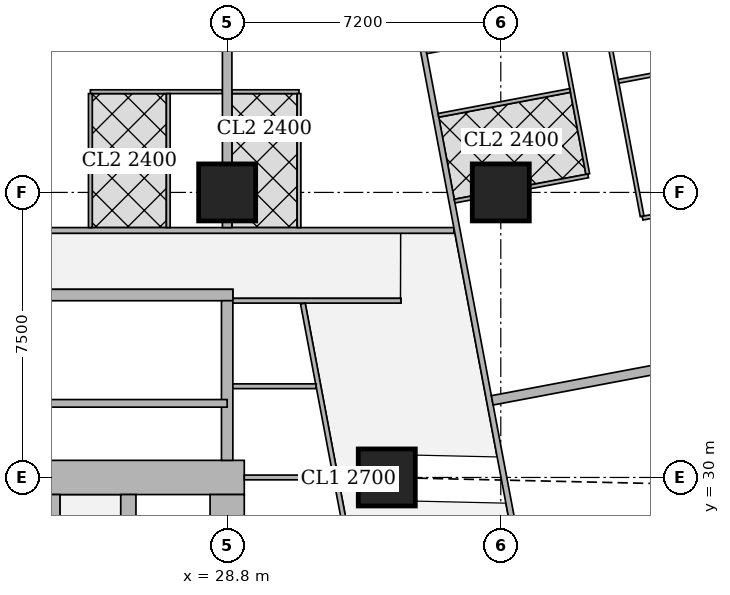
"""IFC4 building model, lengths in metres.
Left out: names, types, materials, properties, quantities, classifications, styles, units other than length and angle.
Written with IfcOpenShell. Run it as: python <this file> out.ifc"""

import sys

from ifc_helpers import new_model, si_unit, direction, frame, frame_2d, origin, origin_2d, place, context, subcontext, project, spatial, rectangle, extrude, element, fill, save


model = new_model("IFC4")
c1 = context("Model", 3, precision=1e-05, world=origin(), true_north=direction((0.0, 1.0)))
c2 = subcontext(c1, "Body", "Model", "MODEL_VIEW")
j1 = project(units=[si_unit("LENGTHUNIT", "METRE"), si_unit("PLANEANGLEUNIT", "RADIAN")], contexts=[c1])
p1 = place(None, origin())
s1 = spatial("IfcSite", under=j1, at=p1, CompositionType="ELEMENT")
p2 = place(p1, origin())
s2 = spatial("IfcBuilding", under=s1, at=p2, CompositionType="ELEMENT")
p3 = place(p2, frame((0.0, 0.0, 180.8)))
s3 = spatial("IfcBuildingStorey", under=s2, at=p3, CompositionType="ELEMENT", Elevation=180.8)
for number, where, z_axis, x_axis in (
    (1, (33.0, 30.0, 0.0), (0.0, 0.0, 1.0), (1.0, 0.0, 0.0)),
    (2, (28.8, 37.5, 0.0), (0.0, 0.0, 1.0), (1.0, 0.0, 0.0)),
    (3, (36.0, 37.5, 0.0), (0.0, 0.0, 1.0), (1.0, 0.0, 0.0)),
):
    element("IfcColumn", number, at=place(p3, frame(where, z_axis=z_axis, x_axis=x_axis)), inside=s3, PredefinedType="COLUMN", context=c2, shape_type="SweptSolid", body=[
        extrude(rectangle(XDim=1.5, YDim=1.5, at=origin_2d()), origin(), (0.0, 0.0, 1.0), 3.75),
    ])
p4 = place(p3, frame((13.95, 30.0, 0.0), z_axis=(0.0, 0.0, 1.0), x_axis=(1.0, 0.0, 0.0)))
e4 = element("IfcWall", 4, at=p4, inside=s3, PredefinedType="SHEAR", context=c2, shape_type="SweptSolid", body=[
    extrude(rectangle(XDim=15.3, YDim=0.9, at=frame_2d((7.65, 0.0))), origin(), (0.0, 0.0, 1.0), 3.75),
])
p5 = place(p4, frame((4.45, 0.0, 0.0)))
e5 = element("IfcOpeningElement", 5, at=p5, cuts=e4, PredefinedType="OPENING", context=c2, shape_type="SweptSolid", body=[
    extrude(rectangle(XDim=1.8, YDim=2.1, at=frame_2d((0.9, 1.05))), frame((0.0, 0.46, 0.0), z_axis=(0.0, -1.0, 0.0), x_axis=(1.0, 0.0, 0.0)), (0.0, 0.0, 1.0), 0.92),
])
p6 = place(p4, frame((10.7, 0.0, 0.0)))
e6 = element("IfcOpeningElement", 6, at=p6, cuts=e4, PredefinedType="OPENING", context=c2, shape_type="SweptSolid", body=[
    extrude(rectangle(XDim=1.1, YDim=2.1, at=frame_2d((0.55, 1.05))), frame((0.0, 0.46, 0.0), z_axis=(0.0, -1.0, 0.0), x_axis=(1.0, 0.0, 0.0)), (0.0, 0.0, 1.0), 0.92),
])
p7 = place(p3, frame((28.8, 15.45, 0.0), z_axis=(0.0, 0.0, 1.0), x_axis=(0.0, 1.0, 0.0)))
e7 = element("IfcWall", 7, at=p7, inside=s3, PredefinedType="SHEAR", context=c2, shape_type="SweptSolid", body=[
    extrude(rectangle(XDim=14.1, YDim=0.9, at=frame_2d((7.05, 0.0))), origin(), (0.0, 0.0, 1.0), 3.75),
])
p8 = place(p3, frame((24.2, 15.45, 0.0), z_axis=(0.0, 0.0, 1.0), x_axis=(0.0, 1.0, 0.0)))
e8 = element("IfcWall", 8, at=p8, inside=s3, PredefinedType="SHEAR", context=c2, shape_type="SweptSolid", body=[
    extrude(rectangle(XDim=14.1, YDim=0.4, at=frame_2d((7.05, 0.0))), origin(), (0.0, 0.0, 1.0), 3.75),
])
p9 = place(p3, frame((26.2, 26.45, 0.0), z_axis=(0.0, 0.0, 1.0), x_axis=(0.0, 1.0, 0.0)))
e9 = element("IfcWall", 9, at=p9, inside=s3, PredefinedType="SHEAR", context=c2, shape_type="SweptSolid", body=[
    extrude(rectangle(XDim=3.1, YDim=0.4, at=frame_2d((1.55, 0.0))), origin(), (0.0, 0.0, 1.0), 3.75),
])
p10 = place(p9, frame((1.075, 0.0, 0.0)))
e10 = element("IfcOpeningElement", 10, at=p10, cuts=e9, PredefinedType="OPENING", context=c2, shape_type="SweptSolid", body=[
    extrude(rectangle(XDim=1.2, YDim=2.1, at=frame_2d((0.6, 1.05))), frame((0.0, 0.21, 0.0), z_axis=(0.0, -1.0, 0.0), x_axis=(1.0, 0.0, 0.0)), (0.0, 0.0, 1.0), 0.42),
])
p11 = place(p3, frame((21.45, 34.8, 0.0), z_axis=(0.0, 0.0, 1.0), x_axis=(1.0, 0.0, 0.0)))
e11 = element("IfcWall", 11, at=p11, inside=s3, PredefinedType="SHEAR", context=c2, shape_type="SweptSolid", body=[
    extrude(rectangle(XDim=7.5, YDim=0.3, at=frame_2d((3.75, 0.0))), origin(), (0.0, 0.0, 1.0), 3.75),
])
p12 = place(p11, frame((0.5, 0.0, 0.0)))
e12 = element("IfcOpeningElement", 12, at=p12, cuts=e11, PredefinedType="OPENING", context=c2, shape_type="SweptSolid", body=[
    extrude(rectangle(XDim=1.1, YDim=2.1, at=frame_2d((0.55, 1.05))), frame((0.0, 0.16, 0.0), z_axis=(0.0, -1.0, 0.0), x_axis=(1.0, 0.0, 0.0)), (0.0, 0.0, 1.0), 0.32),
])
p13 = place(p3, frame((28.8, 30.45, 0.0), z_axis=(0.0, 0.0, 1.0), x_axis=(0.0, 1.0, 0.0)))
e13 = element("IfcWall", 13, at=p13, inside=s3, PredefinedType="SHEAR", context=c2, shape_type="SweptSolid", body=[
    extrude(rectangle(XDim=4.2, YDim=0.3, at=frame_2d((2.1, 0.0))), origin(), (0.0, 0.0, 1.0), 3.75),
])
p14 = place(p3, frame((8.35, 36.5, 0.0), z_axis=(0.0, 0.0, 1.0), x_axis=(1.0, 0.0, 0.0)))
e14 = element("IfcWall", 14, at=p14, inside=s3, PredefinedType="SOLIDWALL", context=c2, shape_type="SweptSolid", body=[
    extrude(rectangle(XDim=26.415, YDim=0.15, at=frame_2d((13.208, 0.0))), origin(), (0.0, 0.0, 1.0), 3.5),
])
p15 = place(p14, frame((2.6, 0.0, 0.0)))
e15 = element("IfcOpeningElement", 15, at=p15, cuts=e14, PredefinedType="OPENING", context=c2, shape_type="SweptSolid", body=[
    extrude(rectangle(XDim=1.0, YDim=2.1, at=frame_2d((0.5, 1.05))), frame((0.0, 0.085, 0.0), z_axis=(0.0, -1.0, 0.0), x_axis=(1.0, 0.0, 0.0)), (0.0, 0.0, 1.0), 0.17),
])
p16 = place(p14, frame((14.75, 0.0, 0.0)))
e16 = element("IfcOpeningElement", 16, at=p16, cuts=e14, PredefinedType="OPENING", context=c2, shape_type="SweptSolid", body=[
    extrude(rectangle(XDim=1.0, YDim=2.1, at=frame_2d((0.5, 1.05))), frame((0.0, 0.085, 0.0), z_axis=(0.0, -1.0, 0.0), x_axis=(1.0, 0.0, 0.0)), (0.0, 0.0, 1.0), 0.17),
])
p17 = place(p14, frame((23.923, 0.0, 0.0)))
e17 = element("IfcOpeningElement", 17, at=p17, cuts=e14, PredefinedType="OPENING", context=c2, shape_type="SweptSolid", body=[
    extrude(rectangle(XDim=1.0, YDim=2.1, at=frame_2d((0.5, 1.05))), frame((0.0, 0.085, 0.0), z_axis=(0.0, -1.0, 0.0), x_axis=(1.0, 0.0, 0.0)), (0.0, 0.0, 1.0), 0.17),
])
p18 = place(p3, frame((33.623, 43.022, 0.0), z_axis=(0.0, 0.0, 1.0), x_axis=(0.185596841028, -0.98262597798, 0.0)))
e18 = element("IfcWall", 18, at=p18, inside=s3, PredefinedType="SOLIDWALL", context=c2, shape_type="SweptSolid", body=[
    extrude(rectangle(XDim=41.66, YDim=0.15, at=frame_2d((20.83, 0.0))), origin(), (0.0, 0.0, 1.0), 2.5),
])
p19 = place(p18, frame((8.034, 0.0, 0.0)))
e19 = element("IfcOpeningElement", 19, at=p19, cuts=e18, PredefinedType="OPENING", context=c2, shape_type="SweptSolid", body=[
    extrude(rectangle(XDim=1.0, YDim=2.1, at=frame_2d((0.5, 1.05))), frame((0.0, 0.085, 0.0), z_axis=(0.0, -1.0, 0.0), x_axis=(1.0, 0.0, 0.0)), (0.0, 0.0, 1.0), 0.17),
])
p20 = place(p18, frame((12.611, 0.0, 0.0)))
e20 = element("IfcOpeningElement", 20, at=p20, cuts=e18, PredefinedType="OPENING", context=c2, shape_type="SweptSolid", body=[
    extrude(rectangle(XDim=1.0, YDim=2.1, at=frame_2d((0.5, 1.05))), frame((0.0, 0.085, 0.0), z_axis=(0.0, -1.0, 0.0), x_axis=(1.0, 0.0, 0.0)), (0.0, 0.0, 1.0), 0.17),
])
p21 = place(p18, frame((20.242, 0.0, 0.0)))
e21 = element("IfcOpeningElement", 21, at=p21, cuts=e18, PredefinedType="OPENING", context=c2, shape_type="SweptSolid", body=[
    extrude(rectangle(XDim=1.0, YDim=2.1, at=frame_2d((0.5, 1.05))), frame((0.0, 0.085, 0.0), z_axis=(0.0, -1.0, 0.0), x_axis=(1.0, 0.0, 0.0)), (0.0, 0.0, 1.0), 0.17),
])
p22 = place(p18, frame((31.206, 0.0, 0.0)))
e22 = element("IfcOpeningElement", 22, at=p22, cuts=e18, PredefinedType="OPENING", context=c2, shape_type="SweptSolid", body=[
    extrude(rectangle(XDim=1.0, YDim=2.1, at=frame_2d((0.5, 1.05))), frame((0.0, 0.085, 0.0), z_axis=(0.0, -1.0, 0.0), x_axis=(1.0, 0.0, 0.0)), (0.0, 0.0, 1.0), 0.17),
])
p23 = place(p3, frame((38.701, 42.27, 0.0), z_axis=(0.0, 0.0, 1.0), x_axis=(0.185474244877, -0.982649125826, 0.0)))
e23 = element("IfcWall", 23, at=p23, inside=s3, PredefinedType="PARTITIONING", context=c2, shape_type="SweptSolid", body=[
    extrude(rectangle(XDim=5.494, YDim=0.1, at=frame_2d((2.747, 0.0))), origin(), (0.0, 0.0, 1.0), 3.5),
])
p24 = place(p23, frame((3.085, 0.0, 0.0)))
e24 = element("IfcOpeningElement", 24, at=p24, cuts=e23, PredefinedType="OPENING", context=c2, shape_type="SweptSolid", body=[
    extrude(rectangle(XDim=0.9, YDim=2.1, at=frame_2d((0.45, 1.05))), frame((0.0, 0.06, 0.0), z_axis=(0.0, -1.0, 0.0), x_axis=(1.0, 0.0, 0.0)), (0.0, 0.0, 1.0), 0.12),
])
p25 = place(p3, frame((37.41, 42.639, 0.0), z_axis=(0.0, 0.0, 1.0), x_axis=(0.185579683022, -0.982629218601, 0.0)))
e25 = element("IfcWall", 25, at=p25, inside=s3, PredefinedType="PARTITIONING", context=c2, shape_type="SweptSolid", body=[
    extrude(rectangle(XDim=4.737, YDim=0.1, at=frame_2d((2.369, 0.0))), origin(), (0.0, 0.0, 1.0), 3.5),
])
p26 = place(p25, frame((3.189, 0.0, 0.0)))
e26 = element("IfcOpeningElement", 26, at=p26, cuts=e25, PredefinedType="OPENING", context=c2, shape_type="SweptSolid", body=[
    extrude(rectangle(XDim=0.9, YDim=2.1, at=frame_2d((0.45, 1.05))), frame((0.0, 0.06, 0.0), z_axis=(0.0, -1.0, 0.0), x_axis=(1.0, 0.0, 0.0)), (0.0, 0.0, 1.0), 0.12),
])
p27 = place(p25, frame((1.191, 0.0, 0.0)))
e27 = element("IfcOpeningElement", 27, at=p27, cuts=e25, PredefinedType="OPENING", context=c2, shape_type="SweptSolid", body=[
    extrude(rectangle(XDim=0.9, YDim=2.1, at=frame_2d((0.45, 1.05))), frame((0.0, 0.06, 0.0), z_axis=(0.0, -1.0, 0.0), x_axis=(1.0, 0.0, 0.0)), (0.0, 0.0, 1.0), 0.12),
])
p28 = place(p3, frame((43.277, 41.212, 0.0), z_axis=(0.0, 0.0, 1.0), x_axis=(-0.982665405803, -0.185387972203, 0.0)))
e28 = element("IfcWall", 28, at=p28, inside=s3, PredefinedType="PARTITIONING", context=c2, shape_type="SweptSolid", body=[
    extrude(rectangle(XDim=4.25, YDim=0.1, at=frame_2d((2.125, 0.0))), origin(), (0.0, 0.0, 1.0), 2.1),
])
p29 = place(p3, frame((41.154, 37.091, 0.0), z_axis=(0.0, 0.0, 1.0), x_axis=(-0.982617614942, -0.185641112921, 0.0)))
e29 = element("IfcWall", 29, at=p29, inside=s3, PredefinedType="PARTITIONING", context=c2, shape_type="SweptSolid", body=[
    extrude(rectangle(XDim=1.449, YDim=0.1, at=frame_2d((0.725, 0.0))), origin(), (0.0, 0.0, 1.0), 3.5),
])
p30 = place(p3, frame((37.823, 40.182, 0.0), z_axis=(0.0, 0.0, 1.0), x_axis=(-0.98263926043, -0.185526504472, 0.0)))
e30 = element("IfcWall", 30, at=p30, inside=s3, PredefinedType="PARTITIONING", context=c2, shape_type="SweptSolid", body=[
    extrude(rectangle(XDim=3.524, YDim=0.1, at=frame_2d((1.762, 0.0))), origin(), (0.0, 0.0, 1.0), 3.5),
])
p31 = place(p3, frame((38.299, 37.935, 0.0), z_axis=(0.0, 0.0, 1.0), x_axis=(-0.98258870752, -0.18579405764, 0.0)))
e31 = element("IfcWall", 31, at=p31, inside=s3, PredefinedType="PARTITIONING", context=c2, shape_type="SweptSolid", body=[
    extrude(rectangle(XDim=1.566, YDim=0.1, at=frame_2d((0.783, 0.0))), origin(), (0.0, 0.0, 1.0), 3.5),
])
p32 = place(p3, frame((35.24, 37.357, 0.0), z_axis=(0.0, 0.0, 1.0), x_axis=(-0.982559813104, -0.18594680334, 0.0)))
e32 = element("IfcWall", 32, at=p32, inside=s3, PredefinedType="PARTITIONING", context=c2, shape_type="SweptSolid", body=[
    extrude(rectangle(XDim=0.462, YDim=0.1, at=frame_2d((0.231, 0.0))), origin(), (0.0, 0.0, 1.0), 3.5),
])
p33 = place(p3, frame((37.507, 41.853, 0.0), z_axis=(0.0, 0.0, 1.0), x_axis=(-0.982629014545, -0.18558076348, 0.0)))
e33 = element("IfcWall", 33, at=p33, inside=s3, PredefinedType="PARTITIONING", context=c2, shape_type="SweptSolid", body=[
    extrude(rectangle(XDim=3.524, YDim=0.1, at=frame_2d((1.762, 0.0))), origin(), (0.0, 0.0, 1.0), 3.5),
])
p34 = place(p33, frame((1.324, 0.0, 0.0)))
e34 = element("IfcOpeningElement", 34, at=p34, cuts=e33, PredefinedType="OPENING", context=c2, shape_type="SweptSolid", body=[
    extrude(rectangle(XDim=0.9, YDim=2.1, at=frame_2d((0.45, 1.05))), frame((0.0, 0.06, 0.0), z_axis=(0.0, -1.0, 0.0), x_axis=(1.0, 0.0, 0.0)), (0.0, 0.0, 1.0), 0.12),
])
p35 = place(p3, frame((40.468, 32.915, 0.0), z_axis=(0.0, 0.0, 1.0), x_axis=(-0.982635807605, -0.185544791394, 0.0)))
e35 = element("IfcWall", 35, at=p35, inside=s3, PredefinedType="SOLIDWALL", context=c2, shape_type="SweptSolid", body=[
    extrude(rectangle(XDim=4.775, YDim=0.25, at=frame_2d((2.388, 0.0))), origin(), (0.0, 0.0, 1.0), 3.5),
])
p36 = place(p3, frame((25.2, 40.15, 0.0), z_axis=(0.0, 0.0, 1.0), x_axis=(1.0, 0.0, 0.0)))
e36 = element("IfcWall", 36, at=p36, inside=s3, PredefinedType="PARTITIONING", context=c2, shape_type="SweptSolid", body=[
    extrude(rectangle(XDim=3.475, YDim=0.1, at=frame_2d((1.738, 0.0))), origin(), (0.0, 0.0, 1.0), 3.5),
])
p37 = place(p36, frame((0.575, 0.0, 0.0)))
e37 = element("IfcOpeningElement", 37, at=p37, cuts=e36, PredefinedType="OPENING", context=c2, shape_type="SweptSolid", body=[
    extrude(rectangle(XDim=0.9, YDim=2.1, at=frame_2d((0.45, 1.05))), frame((0.0, 0.06, 0.0), z_axis=(0.0, -1.0, 0.0), x_axis=(1.0, 0.0, 0.0)), (0.0, 0.0, 1.0), 0.12),
])
p38 = place(p36, frame((2.375, 0.0, 0.0)))
e38 = element("IfcOpeningElement", 38, at=p38, cuts=e36, PredefinedType="OPENING", context=c2, shape_type="SweptSolid", body=[
    extrude(rectangle(XDim=0.9, YDim=2.1, at=frame_2d((0.45, 1.05))), frame((0.0, 0.06, 0.0), z_axis=(0.0, -1.0, 0.0), x_axis=(1.0, 0.0, 0.0)), (0.0, 0.0, 1.0), 0.12),
])
for number, where, z_axis, x_axis in (
    (39, (25.2, 36.575, 0.0), (0.0, 0.0, 1.0), (0.0, 1.0, 0.0)),
    (40, (27.25, 36.575, 0.0), (0.0, 0.0, 1.0), (0.0, 1.0, 0.0)),
):
    element("IfcWall", number, at=place(p3, frame(where, z_axis=z_axis, x_axis=x_axis)), inside=s3, PredefinedType="PARTITIONING", context=c2, shape_type="SweptSolid", body=[
        extrude(rectangle(XDim=3.525, YDim=0.1, at=frame_2d((1.763, 0.0))), origin(), (0.0, 0.0, 1.0), 3.5),
    ])
p39 = place(p3, frame((28.925, 40.15, 0.0), z_axis=(0.0, 0.0, 1.0), x_axis=(1.0, 0.0, 0.0)))
e41 = element("IfcWall", 41, at=p39, inside=s3, PredefinedType="PARTITIONING", context=c2, shape_type="SweptSolid", body=[
    extrude(rectangle(XDim=1.765, YDim=0.1, at=frame_2d((0.882, 0.0))), origin(), (0.0, 0.0, 1.0), 3.5),
])
p40 = place(p39, frame((0.375, 0.0, 0.0)))
e42 = element("IfcOpeningElement", 42, at=p40, cuts=e41, PredefinedType="OPENING", context=c2, shape_type="SweptSolid", body=[
    extrude(rectangle(XDim=0.9, YDim=2.1, at=frame_2d((0.45, 1.05))), frame((0.0, 0.06, 0.0), z_axis=(0.0, -1.0, 0.0), x_axis=(1.0, 0.0, 0.0)), (0.0, 0.0, 1.0), 0.12),
])
p41 = place(p3, frame((30.69, 36.575, 0.0), z_axis=(0.0, 0.0, 1.0), x_axis=(0.0, 1.0, 0.0)))
e43 = element("IfcWall", 43, at=p41, inside=s3, PredefinedType="PARTITIONING", context=c2, shape_type="SweptSolid", body=[
    extrude(rectangle(XDim=3.525, YDim=0.1, at=frame_2d((1.763, 0.0))), origin(), (0.0, 0.0, 1.0), 3.5),
])
p42 = place(p3, frame((28.8, 36.575, 0.0), z_axis=(0.0, 0.0, 1.0), x_axis=(0.0, 1.0, 0.0)))
e44 = element("IfcWall", 44, at=p42, inside=s3, PredefinedType="SOLIDWALL", context=c2, shape_type="SweptSolid", body=[
    extrude(rectangle(XDim=0.174, YDim=0.25, at=frame_2d((0.087, 0.0))), origin(), (0.0, 0.0, 1.0), 3.5),
])
p43 = place(p3, frame((28.8, 38.251, 0.0), z_axis=(0.0, 0.0, 1.0), x_axis=(0.0, 1.0, 0.0)))
e45 = element("IfcWall", 45, at=p43, inside=s3, PredefinedType="SOLIDWALL", context=c2, shape_type="SweptSolid", body=[
    extrude(rectangle(XDim=3.099, YDim=0.25, at=frame_2d((1.55, 0.0))), origin(), (0.0, 0.0, 1.0), 3.5),
])
p44 = place(p3, frame((28.95, 34.65, 0.0), z_axis=(0.0, 0.0, 1.0), x_axis=(1.0, 0.0, 0.0)))
e46 = element("IfcWall", 46, at=p44, inside=s3, PredefinedType="PARTITIONING", context=c2, shape_type="SweptSolid", body=[
    extrude(rectangle(XDim=4.423, YDim=0.125, at=frame_2d((2.211, 0.0))), origin(), (0.0, 0.0, 1.0), 3.5),
])
p45 = place(p3, frame((32.929, 23.263, 0.0), z_axis=(0.0, 0.0, 1.0), x_axis=(-0.185612234763, 0.982623070311, 0.0)))
e47 = element("IfcWall", 47, at=p45, inside=s3, PredefinedType="PARTITIONING", context=c2, shape_type="SweptSolid", body=[
    extrude(rectangle(XDim=11.513, YDim=0.125, at=frame_2d((5.756, 0.0))), origin(), (0.0, 0.0, 1.0), 3.5),
])
p46 = place(p45, frame((0.15, 0.0, 0.0)))
e48 = element("IfcOpeningElement", 48, at=p46, cuts=e47, PredefinedType="OPENING", context=c2, shape_type="SweptSolid", body=[
    extrude(rectangle(XDim=1.0, YDim=2.1, at=frame_2d((0.5, 1.05))), frame((0.0, 0.073, 0.0), z_axis=(0.0, -1.0, 0.0), x_axis=(1.0, 0.0, 0.0)), (0.0, 0.0, 1.0), 0.145),
])
p47 = place(p45, frame((7.679, 0.0, 0.0)))
e49 = element("IfcOpeningElement", 49, at=p47, cuts=e47, PredefinedType="OPENING", context=c2, shape_type="SweptSolid", body=[
    extrude(rectangle(XDim=1.0, YDim=2.1, at=frame_2d((0.5, 1.05))), frame((0.0, 0.073, 0.0), z_axis=(0.0, -1.0, 0.0), x_axis=(1.0, 0.0, 0.0)), (0.0, 0.0, 1.0), 0.145),
])
p48 = place(p45, frame((10.122, 0.0, 0.0)))
e50 = element("IfcOpeningElement", 50, at=p48, cuts=e47, PredefinedType="OPENING", context=c2, shape_type="SweptSolid", body=[
    extrude(rectangle(XDim=1.0, YDim=2.1, at=frame_2d((0.5, 1.05))), frame((0.0, 0.073, 0.0), z_axis=(0.0, -1.0, 0.0), x_axis=(1.0, 0.0, 0.0)), (0.0, 0.0, 1.0), 0.145),
])
p49 = place(p3, frame((29.25, 30.0, 0.0), z_axis=(0.0, 0.0, 1.0), x_axis=(1.0, 0.0, 0.0)))
e51 = element("IfcWall", 51, at=p49, inside=s3, PredefinedType="PARTITIONING", context=c2, shape_type="SweptSolid", body=[
    extrude(rectangle(XDim=2.342, YDim=0.125, at=frame_2d((1.171, 0.0))), origin(), (0.0, 0.0, 1.0), 3.5),
])
p50 = place(p3, frame((28.95, 32.4, 0.0), z_axis=(0.0, 0.0, 1.0), x_axis=(1.0, 0.0, 0.0)))
e52 = element("IfcWall", 52, at=p50, inside=s3, PredefinedType="PARTITIONING", context=c2, shape_type="SweptSolid", body=[
    extrude(rectangle(XDim=2.189, YDim=0.125, at=frame_2d((1.094, 0.0))), origin(), (0.0, 0.0, 1.0), 3.5),
])
p51 = place(p3, frame((23.0, 31.95, 0.0), z_axis=(0.0, 0.0, 1.0), x_axis=(1.0, 0.0, 0.0)))
e53 = element("IfcWall", 53, at=p51, inside=s3, PredefinedType="SHEAR", context=c2, shape_type="SweptSolid", body=[
    extrude(rectangle(XDim=5.8, YDim=0.2, at=frame_2d((2.9, 0.0))), origin(), (0.0, 0.0, 1.0), 3.75),
])
p52 = place(p24, origin())
e54 = element("IfcDoor", 54, at=p52, inside=s3, OperationType="SINGLE_SWING_LEFT", PredefinedType="DOOR", context=c2, shape_type="SweptSolid", body=[
    extrude(rectangle(XDim=0.9, YDim=2.1, at=frame_2d((0.45, 1.05))), frame((0.0, 0.025, 0.0), z_axis=(0.0, -1.0, 0.0), x_axis=(1.0, 0.0, 0.0)), (0.0, 0.0, 1.0), 0.05),
])
fill(e24, e54)
p53 = place(p26, origin())
e55 = element("IfcDoor", 55, at=p53, inside=s3, OperationType="SINGLE_SWING_LEFT", PredefinedType="DOOR", context=c2, shape_type="SweptSolid", body=[
    extrude(rectangle(XDim=0.9, YDim=2.1, at=frame_2d((0.45, 1.05))), frame((0.0, 0.025, 0.0), z_axis=(0.0, -1.0, 0.0), x_axis=(1.0, 0.0, 0.0)), (0.0, 0.0, 1.0), 0.05),
])
fill(e26, e55)
p54 = place(p27, origin())
e56 = element("IfcDoor", 56, at=p54, inside=s3, OperationType="SINGLE_SWING_LEFT", PredefinedType="DOOR", context=c2, shape_type="SweptSolid", body=[
    extrude(rectangle(XDim=0.9, YDim=2.1, at=frame_2d((0.45, 1.05))), frame((0.0, 0.025, 0.0), z_axis=(0.0, -1.0, 0.0), x_axis=(1.0, 0.0, 0.0)), (0.0, 0.0, 1.0), 0.05),
])
fill(e27, e56)
p55 = place(p19, origin())
e57 = element("IfcDoor", 57, at=p55, inside=s3, OperationType="SINGLE_SWING_RIGHT", PredefinedType="DOOR", context=c2, shape_type="SweptSolid", body=[
    extrude(rectangle(XDim=1.0, YDim=2.1, at=frame_2d((0.5, 1.05))), frame((0.0, 0.025, 0.0), z_axis=(0.0, -1.0, 0.0), x_axis=(1.0, 0.0, 0.0)), (0.0, 0.0, 1.0), 0.05),
])
fill(e19, e57)
p56 = place(p20, origin())
e58 = element("IfcDoor", 58, at=p56, inside=s3, OperationType="SINGLE_SWING_LEFT", PredefinedType="DOOR", context=c2, shape_type="SweptSolid", body=[
    extrude(rectangle(XDim=1.0, YDim=2.1, at=frame_2d((0.5, 1.05))), frame((0.0, 0.025, 0.0), z_axis=(0.0, -1.0, 0.0), x_axis=(1.0, 0.0, 0.0)), (0.0, 0.0, 1.0), 0.05),
])
fill(e20, e58)
p57 = place(p37, origin())
e59 = element("IfcDoor", 59, at=p57, inside=s3, OperationType="SINGLE_SWING_RIGHT", PredefinedType="DOOR", context=c2, shape_type="SweptSolid", body=[
    extrude(rectangle(XDim=0.9, YDim=2.1, at=frame_2d((0.45, 1.05))), frame((0.0, 0.025, 0.0), z_axis=(0.0, -1.0, 0.0), x_axis=(1.0, 0.0, 0.0)), (0.0, 0.0, 1.0), 0.05),
])
fill(e37, e59)
p58 = place(p38, origin())
e60 = element("IfcDoor", 60, at=p58, inside=s3, OperationType="SINGLE_SWING_LEFT", PredefinedType="DOOR", context=c2, shape_type="SweptSolid", body=[
    extrude(rectangle(XDim=0.9, YDim=2.1, at=frame_2d((0.45, 1.05))), frame((0.0, 0.025, 0.0), z_axis=(0.0, -1.0, 0.0), x_axis=(1.0, 0.0, 0.0)), (0.0, 0.0, 1.0), 0.05),
])
fill(e38, e60)
p59 = place(p40, origin())
e61 = element("IfcDoor", 61, at=p59, inside=s3, OperationType="SINGLE_SWING_RIGHT", PredefinedType="DOOR", context=c2, shape_type="SweptSolid", body=[
    extrude(rectangle(XDim=0.9, YDim=2.1, at=frame_2d((0.45, 1.05))), frame((0.0, 0.025, 0.0), z_axis=(0.0, -1.0, 0.0), x_axis=(1.0, 0.0, 0.0)), (0.0, 0.0, 1.0), 0.05),
])
fill(e42, e61)
p60 = place(p17, origin())
e62 = element("IfcDoor", 62, at=p60, inside=s3, OperationType="SINGLE_SWING_RIGHT", PredefinedType="DOOR", context=c2, shape_type="SweptSolid", body=[
    extrude(rectangle(XDim=1.0, YDim=2.1, at=frame_2d((0.5, 1.05))), frame((0.0, 0.025, 0.0), z_axis=(0.0, -1.0, 0.0), x_axis=(1.0, 0.0, 0.0)), (0.0, 0.0, 1.0), 0.05),
])
fill(e17, e62)
p61 = place(p47, origin())
e63 = element("IfcDoor", 63, at=p61, inside=s3, OperationType="SINGLE_SWING_RIGHT", PredefinedType="DOOR", context=c2, shape_type="SweptSolid", body=[
    extrude(rectangle(XDim=1.0, YDim=2.1, at=frame_2d((0.5, 1.05))), frame((0.0, 0.025, 0.0), z_axis=(0.0, -1.0, 0.0), x_axis=(1.0, 0.0, 0.0)), (0.0, 0.0, 1.0), 0.05),
])
fill(e49, e63)
p62 = place(p48, origin())
e64 = element("IfcDoor", 64, at=p62, inside=s3, OperationType="SINGLE_SWING_RIGHT", PredefinedType="DOOR", context=c2, shape_type="SweptSolid", body=[
    extrude(rectangle(XDim=1.0, YDim=2.1, at=frame_2d((0.5, 1.05))), frame((0.0, 0.025, 0.0), z_axis=(0.0, -1.0, 0.0), x_axis=(1.0, 0.0, 0.0)), (0.0, 0.0, 1.0), 0.05),
])
fill(e50, e64)
p63 = place(p6, origin())
e65 = element("IfcDoor", 65, at=p63, inside=s3, OperationType="SINGLE_SWING_RIGHT", PredefinedType="DOOR", context=c2, shape_type="SweptSolid", body=[
    extrude(rectangle(XDim=1.1, YDim=2.1, at=frame_2d((0.55, 1.05))), frame((0.0, 0.025, 0.0), z_axis=(0.0, -1.0, 0.0), x_axis=(1.0, 0.0, 0.0)), (0.0, 0.0, 1.0), 0.05),
])
fill(e6, e65)
save(model, sys.argv[1])
